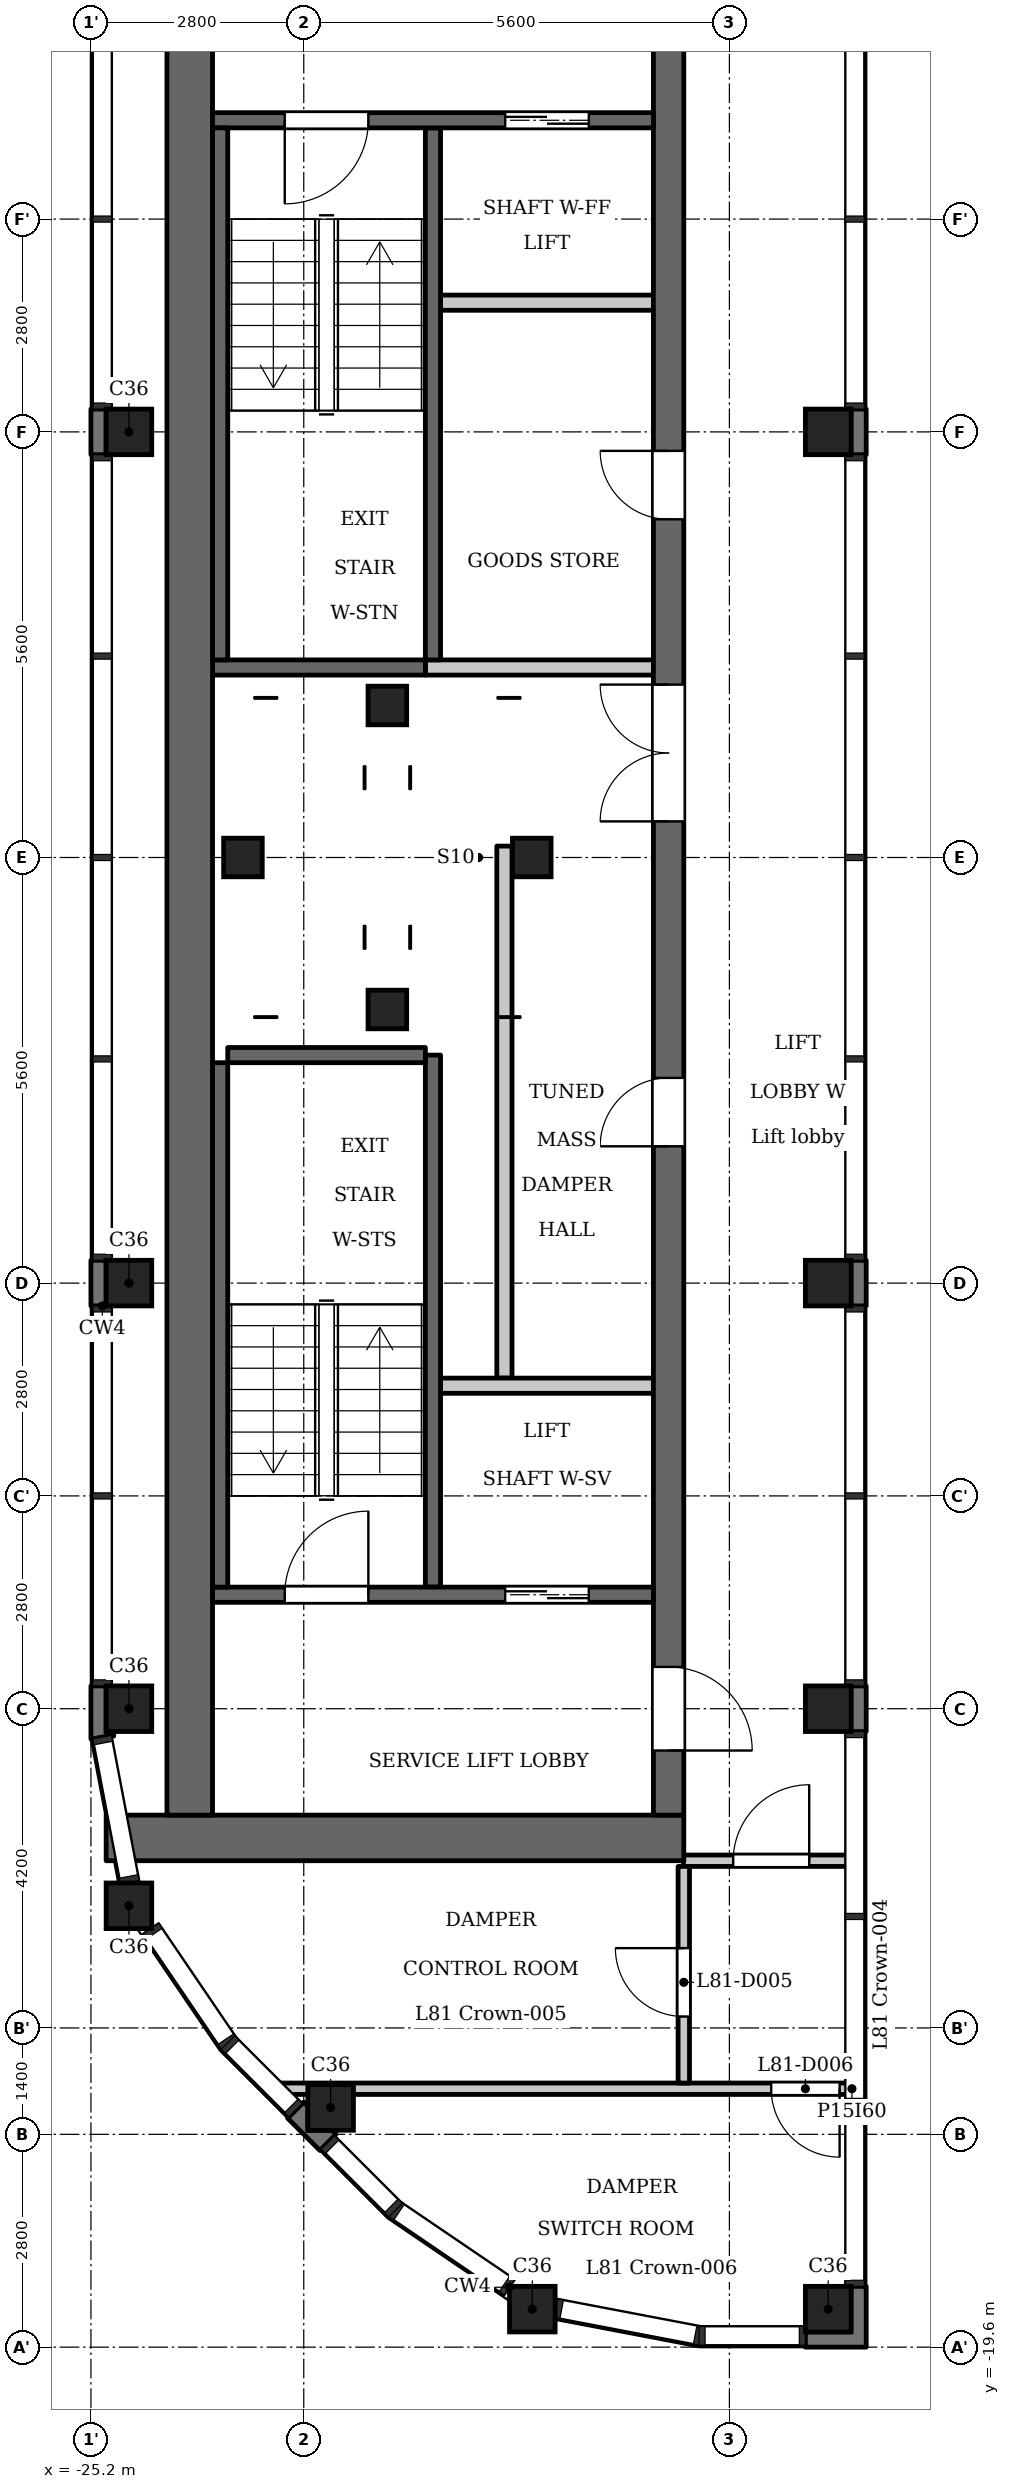
"""IFC4 building model, lengths in metres.
Left out: names, types, materials, properties, quantities, classifications, styles, units other than length and angle.
Written with IfcOpenShell. Run it as: python <this file> out.ifc"""

import sys

from ifc_helpers import new_model, si_unit, direction, frame, frame_2d, origin, origin_2d, place, context, subcontext, project, spatial, polyline, rectangle, hollow_circle, outline, extrude, element, fill, save


model = new_model("IFC4")
c1 = context("Model", 3, precision=1e-05, world=origin(), true_north=direction((0.0, 1.0)))
c2 = subcontext(c1, "Body", "Model", "MODEL_VIEW")
j1 = project(units=[si_unit("LENGTHUNIT", "METRE"), si_unit("PLANEANGLEUNIT", "RADIAN")], contexts=[c1])
p1 = place(None, origin())
s1 = spatial("IfcSite", under=j1, at=p1, CompositionType="ELEMENT")
p2 = place(p1, origin())
s2 = spatial("IfcBuilding", under=s1, at=p2, CompositionType="ELEMENT")
p3 = place(p2, frame((0.0, 0.0, 313.9)))
s3 = spatial("IfcBuildingStorey", under=s2, at=p3, CompositionType="ELEMENT", Elevation=313.9)
for number, where, z_axis, x_axis in (
    (1, (-24.7, -13.793, 0.0), (0.0, 0.0, 1.0), (1.0, 0.0, 0.0)),
    (2, (-24.7, -11.2, 0.0), (0.0, 0.0, 1.0), (1.0, 0.0, 0.0)),
    (3, (-24.7, -5.6, 0.0), (0.0, 0.0, 1.0), (1.0, 0.0, 0.0)),
    (4, (-24.7, 5.6, 0.0), (0.0, 0.0, 1.0), (1.0, 0.0, 0.0)),
    (5, (-22.046, -16.446, 0.0), (0.0, 0.0, 1.0), (1.0, 0.0, 0.0)),
    (6, (-19.393, -19.1, 0.0), (0.0, 0.0, 1.0), (1.0, 0.0, 0.0)),
    (7, (-15.5, -19.1, 0.0), (0.0, 0.0, 1.0), (1.0, 0.0, 0.0)),
    (8, (-15.5, -11.2, 0.0), (0.0, 0.0, 1.0), (1.0, 0.0, 0.0)),
    (9, (-15.5, -5.6, 0.0), (0.0, 0.0, 1.0), (1.0, 0.0, 0.0)),
    (10, (-15.5, 5.6, 0.0), (0.0, 0.0, 1.0), (1.0, 0.0, 0.0)),
):
    element("IfcColumn", number, at=place(p3, frame(where, z_axis=z_axis, x_axis=x_axis)), inside=s3, PredefinedType="COLUMN", context=c2, shape_type="SweptSolid", body=[
        extrude(rectangle(XDim=0.6, YDim=0.6, at=origin_2d()), origin(), (0.0, 0.0, 1.0), 3.5),
    ])
for number, where, z_axis, x_axis in (
    (11, (-23.2, 0.0, 0.0), (0.0, 0.0, 1.0), (1.0, 0.0, 0.0)),
    (12, (-19.4, 0.0, 0.0), (0.0, 0.0, 1.0), (1.0, 0.0, 0.0)),
    (13, (-21.3, -2.0, 0.0), (0.0, 0.0, 1.0), (1.0, 0.0, 0.0)),
    (14, (-21.3, 2.0, 0.0), (0.0, 0.0, 1.0), (1.0, 0.0, 0.0)),
):
    element("IfcColumn", number, at=place(p3, frame(where, z_axis=z_axis, x_axis=x_axis)), inside=s3, PredefinedType="COLUMN", context=c2, shape_type="SweptSolid", body=[
        extrude(hollow_circle(Radius=0.254, WallThickness=0.025, at=origin_2d()), origin(), (0.0, 0.0, 1.0), 1.2),
    ])
for number, where, z_axis, x_axis in (
    (15, (-20.7, 2.6, 0.0), (0.0, 0.0, 1.0), (0.0, 1.0, 0.0)),
    (16, (-20.7, -9.6, 0.0), (0.0, 0.0, 1.0), (0.0, 1.0, 0.0)),
):
    element("IfcWall", number, at=place(p3, frame(where, z_axis=z_axis, x_axis=x_axis)), inside=s3, PredefinedType="SHEAR", context=c2, shape_type="SweptSolid", body=[
        extrude(rectangle(XDim=7.0, YDim=0.2, at=frame_2d((3.5, 0.0))), origin(), (0.0, 0.0, 1.0), 3.2),
    ])
p4 = place(p3, frame((-20.8, 2.5, 0.0), z_axis=(0.0, 0.0, 1.0), x_axis=(-1.0, 0.0, 0.0)))
e17 = element("IfcWall", 17, at=p4, inside=s3, PredefinedType="SHEAR", context=c2, shape_type="SweptSolid", body=[
    extrude(rectangle(XDim=2.8, YDim=0.2, at=frame_2d((1.4, 0.0))), origin(), (0.0, 0.0, 1.0), 3.2),
])
p5 = place(p3, frame((-17.4, -12.9, 0.0), z_axis=(0.0, 0.0, 1.0), x_axis=(-1.0, 0.0, 0.0)))
e18 = element("IfcWall", 18, at=p5, inside=s3, PredefinedType="SHEAR", context=c2, shape_type="SweptSolid", body=[
    extrude(rectangle(XDim=7.6, YDim=0.6, at=frame_2d((3.8, 0.0))), origin(), (0.0, 0.0, 1.0), 3.2),
])
p6 = place(p3, frame((-19.76, -6.85, 0.0), z_axis=(0.0, 0.0, 1.0), x_axis=(0.0, 1.0, 0.0)))
e19 = element("IfcWall", 19, at=p6, inside=s3, PredefinedType="PARTITIONING", context=c2, shape_type="SweptSolid", body=[
    extrude(rectangle(XDim=7.0, YDim=0.2, at=frame_2d((3.5, 0.0))), origin(), (0.0, 0.0, 1.0), 3.2),
])
p7 = place(p3, frame((-17.6, -12.6, 0.0), z_axis=(0.0, 0.0, 1.0), x_axis=(0.0, 1.0, 0.0)))
e20 = element("IfcWall", 20, at=p7, inside=s3, PredefinedType="SHEAR", context=c2, shape_type="SweptSolid", body=[
    extrude(rectangle(XDim=25.2, YDim=0.4, at=frame_2d((12.6, 0.0))), origin(), (0.0, 0.0, 1.0), 3.2),
])
p8 = place(p7, frame((8.8, 0.0, 0.0)))
e21 = element("IfcOpeningElement", 21, at=p8, cuts=e20, PredefinedType="OPENING", context=c2, shape_type="SweptSolid", body=[
    extrude(rectangle(XDim=0.9, YDim=2.1, at=frame_2d((0.45, 1.05))), frame((0.0, 0.21, 0.0), z_axis=(0.0, -1.0, 0.0), x_axis=(1.0, 0.0, 0.0)), (0.0, 0.0, 1.0), 0.42),
])
p9 = place(p7, frame((17.05, 0.0, 0.0)))
e22 = element("IfcOpeningElement", 22, at=p9, cuts=e20, PredefinedType="OPENING", context=c2, shape_type="SweptSolid", body=[
    extrude(rectangle(XDim=0.9, YDim=2.1, at=frame_2d((0.45, 1.05))), frame((0.0, 0.21, 0.0), z_axis=(0.0, -1.0, 0.0), x_axis=(1.0, 0.0, 0.0)), (0.0, 0.0, 1.0), 0.42),
])
p10 = place(p7, frame((23.25, 0.0, 0.0)))
e23 = element("IfcOpeningElement", 23, at=p10, cuts=e20, PredefinedType="OPENING", context=c2, shape_type="SweptSolid", body=[
    extrude(rectangle(XDim=1.1, YDim=2.1, at=frame_2d((0.55, 1.05))), frame((0.0, 0.21, 0.0), z_axis=(0.0, -1.0, 0.0), x_axis=(1.0, 0.0, 0.0)), (0.0, 0.0, 1.0), 0.42),
])
p11 = place(p7, frame((0.85, 0.0, 0.0)))
e24 = element("IfcOpeningElement", 24, at=p11, cuts=e20, PredefinedType="OPENING", context=c2, shape_type="SweptSolid", body=[
    extrude(rectangle(XDim=1.1, YDim=2.1, at=frame_2d((0.55, 1.05))), frame((0.0, 0.21, 0.0), z_axis=(0.0, -1.0, 0.0), x_axis=(1.0, 0.0, 0.0)), (0.0, 0.0, 1.0), 0.42),
])
p12 = place(p7, frame((13.075, 0.0, 0.0)))
e25 = element("IfcOpeningElement", 25, at=p12, cuts=e20, PredefinedType="OPENING", context=c2, shape_type="SweptSolid", body=[
    extrude(rectangle(XDim=1.8, YDim=2.1, at=frame_2d((0.9, 1.05))), frame((0.0, 0.21, 0.0), z_axis=(0.0, -1.0, 0.0), x_axis=(1.0, 0.0, 0.0)), (0.0, 0.0, 1.0), 0.42),
])
p13 = place(p3, frame((-23.9, -12.6, 0.0), z_axis=(0.0, 0.0, 1.0), x_axis=(0.0, 1.0, 0.0)))
e26 = element("IfcWall", 26, at=p13, inside=s3, PredefinedType="SHEAR", context=c2, shape_type="SweptSolid", body=[
    extrude(rectangle(XDim=25.2, YDim=0.6, at=frame_2d((12.6, 0.0))), origin(), (0.0, 0.0, 1.0), 3.2),
])
p14 = place(p3, frame((-17.8, -9.7, 0.0), z_axis=(0.0, 0.0, 1.0), x_axis=(-1.0, 0.0, 0.0)))
e27 = element("IfcWall", 27, at=p14, inside=s3, PredefinedType="SHEAR", context=c2, shape_type="SweptSolid", body=[
    extrude(rectangle(XDim=5.8, YDim=0.2, at=frame_2d((2.9, 0.0))), origin(), (0.0, 0.0, 1.0), 3.2),
])
p15 = place(p14, frame((0.85, 0.0, 0.0)))
e28 = element("IfcOpeningElement", 28, at=p15, cuts=e27, PredefinedType="OPENING", context=c2, shape_type="SweptSolid", body=[
    extrude(rectangle(XDim=1.1, YDim=2.1, at=frame_2d((0.55, 1.05))), frame((0.0, 0.11, 0.0), z_axis=(0.0, -1.0, 0.0), x_axis=(1.0, 0.0, 0.0)), (0.0, 0.0, 1.0), 0.22),
])
p16 = place(p14, frame((3.75, 0.0, 0.0)))
e29 = element("IfcOpeningElement", 29, at=p16, cuts=e27, PredefinedType="OPENING", context=c2, shape_type="SweptSolid", body=[
    extrude(rectangle(XDim=1.1, YDim=2.1, at=frame_2d((0.55, 1.05))), frame((0.0, 0.11, 0.0), z_axis=(0.0, -1.0, 0.0), x_axis=(1.0, 0.0, 0.0)), (0.0, 0.0, 1.0), 0.22),
])
p17 = place(p3, frame((-17.8, -6.95, 0.0), z_axis=(0.0, 0.0, 1.0), x_axis=(-1.0, 0.0, 0.0)))
e30 = element("IfcWall", 30, at=p17, inside=s3, PredefinedType="PARTITIONING", context=c2, shape_type="SweptSolid", body=[
    extrude(rectangle(XDim=2.8, YDim=0.2, at=frame_2d((1.4, 0.0))), origin(), (0.0, 0.0, 1.0), 3.2),
])
p18 = place(p3, frame((-17.8, 2.5, 0.0), z_axis=(0.0, 0.0, 1.0), x_axis=(-1.0, 0.0, 0.0)))
e31 = element("IfcWall", 31, at=p18, inside=s3, PredefinedType="PARTITIONING", context=c2, shape_type="SweptSolid", body=[
    extrude(rectangle(XDim=3.0, YDim=0.2, at=frame_2d((1.5, 0.0))), origin(), (0.0, 0.0, 1.0), 3.2),
])
p19 = place(p3, frame((-17.8, 7.3, 0.0), z_axis=(0.0, 0.0, 1.0), x_axis=(-1.0, 0.0, 0.0)))
e32 = element("IfcWall", 32, at=p19, inside=s3, PredefinedType="PARTITIONING", context=c2, shape_type="SweptSolid", body=[
    extrude(rectangle(XDim=2.8, YDim=0.2, at=frame_2d((1.4, 0.0))), origin(), (0.0, 0.0, 1.0), 3.2),
])
p20 = place(p3, frame((-17.8, 9.7, 0.0), z_axis=(0.0, 0.0, 1.0), x_axis=(-1.0, 0.0, 0.0)))
e33 = element("IfcWall", 33, at=p20, inside=s3, PredefinedType="SHEAR", context=c2, shape_type="SweptSolid", body=[
    extrude(rectangle(XDim=5.8, YDim=0.2, at=frame_2d((2.9, 0.0))), origin(), (0.0, 0.0, 1.0), 3.2),
])
p21 = place(p20, frame((0.85, 0.0, 0.0)))
e34 = element("IfcOpeningElement", 34, at=p21, cuts=e33, PredefinedType="OPENING", context=c2, shape_type="SweptSolid", body=[
    extrude(rectangle(XDim=1.1, YDim=2.1, at=frame_2d((0.55, 1.05))), frame((0.0, 0.11, 0.0), z_axis=(0.0, -1.0, 0.0), x_axis=(1.0, 0.0, 0.0)), (0.0, 0.0, 1.0), 0.22),
])
p22 = place(p20, frame((3.75, 0.0, 0.0)))
e35 = element("IfcOpeningElement", 35, at=p22, cuts=e33, PredefinedType="OPENING", context=c2, shape_type="SweptSolid", body=[
    extrude(rectangle(XDim=1.1, YDim=2.1, at=frame_2d((0.55, 1.05))), frame((0.0, 0.11, 0.0), z_axis=(0.0, -1.0, 0.0), x_axis=(1.0, 0.0, 0.0)), (0.0, 0.0, 1.0), 0.22),
])
p23 = place(p3, frame((-23.5, 2.6, 0.0), z_axis=(0.0, 0.0, 1.0), x_axis=(0.0, 1.0, 0.0)))
e36 = element("IfcWall", 36, at=p23, inside=s3, PredefinedType="SHEAR", context=c2, shape_type="SweptSolid", body=[
    extrude(rectangle(XDim=7.0, YDim=0.2, at=frame_2d((3.5, 0.0))), origin(), (0.0, 0.0, 1.0), 3.2),
])
p24 = place(p3, frame((-23.5, -9.6, 0.0), z_axis=(0.0, 0.0, 1.0), x_axis=(0.0, 1.0, 0.0)))
e37 = element("IfcWall", 37, at=p24, inside=s3, PredefinedType="SHEAR", context=c2, shape_type="SweptSolid", body=[
    extrude(rectangle(XDim=6.9, YDim=0.2, at=frame_2d((3.45, 0.0))), origin(), (0.0, 0.0, 1.0), 3.2),
])
p25 = place(p3, frame((-20.8, -2.6, 0.0), z_axis=(0.0, 0.0, 1.0), x_axis=(-1.0, 0.0, 0.0)))
e38 = element("IfcWall", 38, at=p25, inside=s3, PredefinedType="SHEAR", context=c2, shape_type="SweptSolid", body=[
    extrude(rectangle(XDim=2.6, YDim=0.2, at=frame_2d((1.3, 0.0))), origin(), (0.0, 0.0, 1.0), 3.2),
])
p26 = place(p3, frame((-22.742, -16.2, 0.0), z_axis=(0.0, 0.0, 1.0), x_axis=(1.0, 0.0, 0.0)))
e39 = element("IfcWall", 39, at=p26, inside=s3, PredefinedType="PARTITIONING", context=c2, shape_type="SweptSolid", body=[
    extrude(rectangle(XDim=7.554, YDim=0.15, at=frame_2d((3.777, 0.0))), origin(), (0.0, 0.0, 1.0), 3.2),
])
p27 = place(p26, frame((6.492, 0.0, 0.0)))
e40 = element("IfcOpeningElement", 40, at=p27, cuts=e39, PredefinedType="OPENING", context=c2, shape_type="SweptSolid", body=[
    extrude(rectangle(XDim=0.9, YDim=2.1, at=frame_2d((0.45, 1.05))), frame((0.0, 0.085, 0.0), z_axis=(0.0, -1.0, 0.0), x_axis=(1.0, 0.0, 0.0)), (0.0, 0.0, 1.0), 0.17),
])
p28 = place(p3, frame((-17.405, -13.2, 0.0), z_axis=(0.0, 0.0, 1.0), x_axis=(1.0, 0.0, 0.0)))
e41 = element("IfcWall", 41, at=p28, inside=s3, PredefinedType="PARTITIONING", context=c2, shape_type="SweptSolid", body=[
    extrude(rectangle(XDim=2.217, YDim=0.15, at=frame_2d((1.108, 0.0))), origin(), (0.0, 0.0, 1.0), 3.2),
])
p29 = place(p28, frame((0.655, 0.0, 0.0)))
e42 = element("IfcOpeningElement", 42, at=p29, cuts=e41, PredefinedType="OPENING", context=c2, shape_type="SweptSolid", body=[
    extrude(rectangle(XDim=1.0, YDim=2.1, at=frame_2d((0.5, 1.05))), frame((0.0, 0.085, 0.0), z_axis=(0.0, -1.0, 0.0), x_axis=(1.0, 0.0, 0.0)), (0.0, 0.0, 1.0), 0.17),
])
p30 = place(p3, frame((-17.4, -16.125, 0.0), z_axis=(0.0, 0.0, 1.0), x_axis=(0.0, 1.0, 0.0)))
e43 = element("IfcWall", 43, at=p30, inside=s3, PredefinedType="PARTITIONING", context=c2, shape_type="SweptSolid", body=[
    extrude(rectangle(XDim=2.85, YDim=0.15, at=frame_2d((1.425, 0.0))), origin(), (0.0, 0.0, 1.0), 3.2),
])
p31 = place(p30, frame((0.875, 0.0, 0.0)))
e44 = element("IfcOpeningElement", 44, at=p31, cuts=e43, PredefinedType="OPENING", context=c2, shape_type="SweptSolid", body=[
    extrude(rectangle(XDim=0.9, YDim=2.1, at=frame_2d((0.45, 1.05))), frame((0.0, 0.085, 0.0), z_axis=(0.0, -1.0, 0.0), x_axis=(1.0, 0.0, 0.0)), (0.0, 0.0, 1.0), 0.17),
])
p32 = place(p3, origin())
e45 = element("IfcWall", 45, at=p32, inside=s3, PredefinedType="SOLIDWALL", context=c2, shape_type="SweptSolid", body=[
    extrude(outline(polyline([(-25.2, -10.9), (-25.2, -11.601), (-24.903, -11.544), (-24.9, -11.561), (-24.9, -11.5), (-25.0, -11.5), (-25.0, -10.9), (-25.2, -10.9)])), origin(), (0.0, 0.0, 1.0), 3.2),
])
e46 = element("IfcWall", 46, at=p32, inside=s3, PredefinedType="SOLIDWALL", context=c2, shape_type="SweptSolid", body=[
    extrude(outline(polyline([(-25.0, -5.3), (-25.2, -5.3), (-25.2, -5.9), (-24.9, -5.9), (-25.0, -5.9), (-25.0, -5.3)])), origin(), (0.0, 0.0, 1.0), 3.2),
])
e47 = element("IfcWall", 47, at=p32, inside=s3, PredefinedType="SOLIDWALL", context=c2, shape_type="SweptSolid", body=[
    extrude(outline(polyline([(-25.0, 5.9), (-25.2, 5.9), (-25.2, 5.3), (-25.0, 5.3), (-25.0, 5.9)])), origin(), (0.0, 0.0, 1.0), 3.2),
])
e48 = element("IfcWall", 48, at=p32, inside=s3, PredefinedType="SOLIDWALL", context=c2, shape_type="SweptSolid", body=[
    extrude(outline(polyline([(-15.2, 5.3), (-15.0, 5.3), (-15.0, 5.9), (-15.3, 5.9), (-15.2, 5.9), (-15.2, 5.3)])), origin(), (0.0, 0.0, 1.0), 3.2),
])
e49 = element("IfcWall", 49, at=p32, inside=s3, PredefinedType="SOLIDWALL", context=c2, shape_type="SweptSolid", body=[
    extrude(outline(polyline([(-15.3, -5.9), (-15.0, -5.9), (-15.0, -5.3), (-15.3, -5.3), (-15.2, -5.3), (-15.2, -5.9), (-15.3, -5.9)])), origin(), (0.0, 0.0, 1.0), 3.2),
])
e50 = element("IfcWall", 50, at=p32, inside=s3, PredefinedType="SOLIDWALL", context=c2, shape_type="SweptSolid", body=[
    extrude(outline(polyline([(-15.2, -11.5), (-15.0, -11.5), (-15.0, -10.9), (-15.2, -10.9), (-15.2, -11.5)])), origin(), (0.0, 0.0, 1.0), 3.2),
])
e51 = element("IfcWall", 51, at=p32, inside=s3, PredefinedType="SOLIDWALL", context=c2, shape_type="SweptSolid", body=[
    extrude(outline(polyline([(-15.8, -19.6), (-15.0, -19.6), (-15.0, -18.8), (-15.2, -18.8), (-15.2, -19.4), (-15.8, -19.4), (-15.8, -19.6)])), origin(), (0.0, 0.0, 1.0), 3.2),
])
e52 = element("IfcWall", 52, at=p32, inside=s3, PredefinedType="SOLIDWALL", context=c2, shape_type="SweptSolid", body=[
    extrude(outline(polyline([(-22.4, -16.376), (-22.612, -16.588), (-22.188, -17.012), (-21.976, -16.8), (-22.029, -16.746), (-22.346, -16.746), (-22.346, -16.429), (-22.4, -16.376)])), origin(), (0.0, 0.0, 1.0), 3.2),
])
p33 = place(p15, origin())
e53 = element("IfcDoor", 53, at=p33, inside=s3, OperationType="DOUBLE_DOOR_SLIDING", PredefinedType="DOOR", context=c2, shape_type="SweptSolid", body=[
    extrude(rectangle(XDim=1.1, YDim=2.1, at=frame_2d((0.55, 1.05))), frame((0.0, 0.025, 0.0), z_axis=(0.0, -1.0, 0.0), x_axis=(1.0, 0.0, 0.0)), (0.0, 0.0, 1.0), 0.05),
])
fill(e28, e53)
p34 = place(p8, origin())
e54 = element("IfcDoor", 54, at=p34, inside=s3, OperationType="SINGLE_SWING_RIGHT", PredefinedType="DOOR", context=c2, shape_type="SweptSolid", body=[
    extrude(rectangle(XDim=0.9, YDim=2.1, at=frame_2d((0.45, 1.05))), frame((0.0, 0.025, 0.0), z_axis=(0.0, -1.0, 0.0), x_axis=(1.0, 0.0, 0.0)), (0.0, 0.0, 1.0), 0.05),
])
fill(e21, e54)
p35 = place(p9, origin())
e55 = element("IfcDoor", 55, at=p35, inside=s3, OperationType="SINGLE_SWING_LEFT", PredefinedType="DOOR", context=c2, shape_type="SweptSolid", body=[
    extrude(rectangle(XDim=0.9, YDim=2.1, at=frame_2d((0.45, 1.05))), frame((0.0, 0.025, 0.0), z_axis=(0.0, -1.0, 0.0), x_axis=(1.0, 0.0, 0.0)), (0.0, 0.0, 1.0), 0.05),
])
fill(e22, e55)
p36 = place(p21, origin())
e56 = element("IfcDoor", 56, at=p36, inside=s3, OperationType="DOUBLE_DOOR_SLIDING", PredefinedType="DOOR", context=c2, shape_type="SweptSolid", body=[
    extrude(rectangle(XDim=1.1, YDim=2.1, at=frame_2d((0.55, 1.05))), frame((0.0, 0.025, 0.0), z_axis=(0.0, -1.0, 0.0), x_axis=(1.0, 0.0, 0.0)), (0.0, 0.0, 1.0), 0.05),
])
fill(e34, e56)
p37 = place(p11, origin())
e57 = element("IfcDoor", 57, at=p37, inside=s3, OperationType="SINGLE_SWING_LEFT", PredefinedType="DOOR", context=c2, shape_type="SweptSolid", body=[
    extrude(rectangle(XDim=1.1, YDim=2.1, at=frame_2d((0.55, 1.05))), frame((0.0, 0.025, 0.0), z_axis=(0.0, -1.0, 0.0), x_axis=(1.0, 0.0, 0.0)), (0.0, 0.0, 1.0), 0.05),
])
fill(e24, e57)
p38 = place(p22, origin())
e58 = element("IfcDoor", 58, at=p38, inside=s3, OperationType="SINGLE_SWING_LEFT", PredefinedType="DOOR", context=c2, shape_type="SweptSolid", body=[
    extrude(rectangle(XDim=1.1, YDim=2.1, at=frame_2d((0.55, 1.05))), frame((0.0, 0.025, 0.0), z_axis=(0.0, -1.0, 0.0), x_axis=(1.0, 0.0, 0.0)), (0.0, 0.0, 1.0), 0.05),
])
fill(e35, e58)
p39 = place(p16, origin())
e59 = element("IfcDoor", 59, at=p39, inside=s3, OperationType="SINGLE_SWING_LEFT", PredefinedType="DOOR", context=c2, shape_type="SweptSolid", body=[
    extrude(rectangle(XDim=1.1, YDim=2.1, at=frame_2d((0.55, 1.05))), frame((0.0, 0.025, 0.0), z_axis=(0.0, -1.0, 0.0), x_axis=(1.0, 0.0, 0.0)), (0.0, 0.0, 1.0), 0.05),
])
fill(e29, e59)
p40 = place(p12, origin())
e60 = element("IfcDoor", 60, at=p40, inside=s3, OperationType="DOUBLE_DOOR_SINGLE_SWING", PredefinedType="DOOR", context=c2, shape_type="SweptSolid", body=[
    extrude(rectangle(XDim=1.8, YDim=2.1, at=frame_2d((0.9, 1.05))), frame((0.0, 0.025, 0.0), z_axis=(0.0, -1.0, 0.0), x_axis=(1.0, 0.0, 0.0)), (0.0, 0.0, 1.0), 0.05),
])
fill(e25, e60)
p41 = place(p29, origin())
e61 = element("IfcDoor", 61, at=p41, inside=s3, OperationType="SINGLE_SWING_LEFT", PredefinedType="DOOR", context=c2, shape_type="SweptSolid", body=[
    extrude(rectangle(XDim=1.0, YDim=2.1, at=frame_2d((0.5, 1.05))), frame((0.0, 0.025, 0.0), z_axis=(0.0, -1.0, 0.0), x_axis=(1.0, 0.0, 0.0)), (0.0, 0.0, 1.0), 0.05),
])
fill(e42, e61)
p42 = place(p31, origin())
e62 = element("IfcDoor", 62, at=p42, inside=s3, OperationType="SINGLE_SWING_LEFT", PredefinedType="DOOR", context=c2, shape_type="SweptSolid", body=[
    extrude(rectangle(XDim=0.9, YDim=2.1, at=frame_2d((0.45, 1.05))), frame((0.0, 0.025, 0.0), z_axis=(0.0, -1.0, 0.0), x_axis=(1.0, 0.0, 0.0)), (0.0, 0.0, 1.0), 0.05),
])
fill(e44, e62)
p43 = place(p27, origin())
e63 = element("IfcDoor", 63, at=p43, inside=s3, OperationType="SINGLE_SWING_RIGHT", PredefinedType="DOOR", context=c2, shape_type="SweptSolid", body=[
    extrude(rectangle(XDim=0.9, YDim=2.1, at=frame_2d((0.45, 1.05))), frame((0.0, 0.025, 0.0), z_axis=(0.0, -1.0, 0.0), x_axis=(1.0, 0.0, 0.0)), (0.0, 0.0, 1.0), 0.05),
])
fill(e40, e63)
save(model, sys.argv[1])
